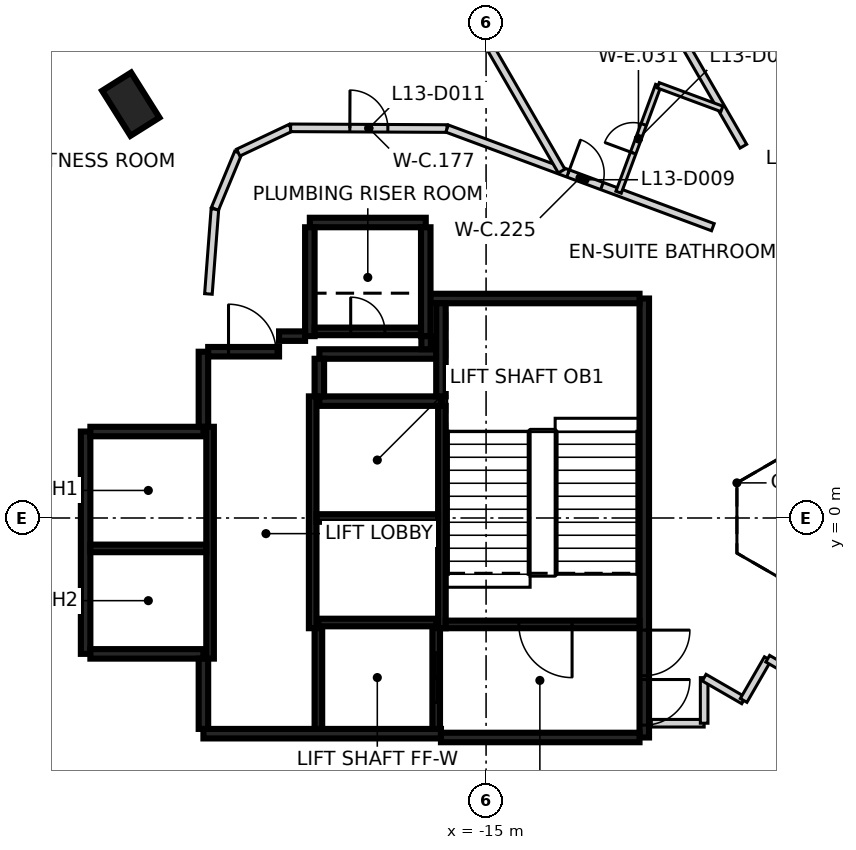
"""IFC4 building model, lengths in metres.
Left out: names, types, materials, properties, quantities, classifications, styles, units other than length and angle.
Written with IfcOpenShell. Run it as: python <this file> out.ifc"""

import sys

from ifc_helpers import new_model, si_unit, direction, frame, frame_2d, origin, origin_2d, place, context, subcontext, project, spatial, rectangle, extrude, element, fill, save


model = new_model("IFC4")
c1 = context("Model", 3, precision=1e-05, world=origin(), true_north=direction((0.0, 1.0)))
c2 = subcontext(c1, "Body", "Model", "MODEL_VIEW")
j1 = project(units=[si_unit("LENGTHUNIT", "METRE"), si_unit("PLANEANGLEUNIT", "RADIAN")], contexts=[c1])
p1 = place(None, origin())
s1 = spatial("IfcSite", under=j1, at=p1, CompositionType="ELEMENT")
p2 = place(p1, origin())
s2 = spatial("IfcBuilding", under=s1, at=p2, CompositionType="ELEMENT")
p3 = place(p2, frame((0.0, 0.0, 60.2)))
s3 = spatial("IfcBuildingStorey", under=s2, at=p3, CompositionType="ELEMENT", Elevation=60.2)
p4 = place(p3, frame((-24.349, 10.888, -0.475), z_axis=(0.0, 0.0, 1.0), x_axis=(-0.532388815436, 0.84649994046, 0.0)))
e1 = element("IfcColumn", 1, at=p4, inside=s3, PredefinedType="COLUMN", context=c2, shape_type="SweptSolid", body=[
    extrude(rectangle(XDim=1.4, YDim=0.9, at=origin_2d()), origin(), (0.0, 0.0, 1.0), 3.6),
])
p5 = place(p3, frame((-10.837, 5.775, 0.0), z_axis=(0.0, 0.0, 1.0), x_axis=(0.0, -1.0, 0.0)))
e2 = element("IfcWall", 2, at=p5, inside=s3, PredefinedType="SHEAR", context=c2, shape_type="SweptSolid", body=[
    extrude(rectangle(XDim=11.55, YDim=0.25, at=frame_2d((5.775, 0.0))), origin(), (0.0, 0.0, 1.0), 3.125),
])
p6 = place(p5, frame((10.025, 0.0, 0.0)))
e3 = element("IfcOpeningElement", 3, at=p6, cuts=e2, PredefinedType="OPENING", context=c2, shape_type="SweptSolid", body=[
    extrude(rectangle(XDim=1.2, YDim=2.1, at=frame_2d((0.6, 1.05))), frame((0.0, 0.135, 0.0), z_axis=(0.0, -1.0, 0.0), x_axis=(1.0, 0.0, 0.0)), (0.0, 0.0, 1.0), 0.27),
])
p7 = place(p5, frame((8.725, 0.0, 0.0)))
e4 = element("IfcOpeningElement", 4, at=p7, cuts=e2, PredefinedType="OPENING", context=c2, shape_type="SweptSolid", body=[
    extrude(rectangle(XDim=1.2, YDim=2.1, at=frame_2d((0.6, 1.05))), frame((0.0, 0.135, 0.0), z_axis=(0.0, -1.0, 0.0), x_axis=(1.0, 0.0, 0.0)), (0.0, 0.0, 1.0), 0.27),
])
p8 = place(p3, frame((-16.187, -5.675, 0.0), z_axis=(0.0, 0.0, 1.0), x_axis=(-1.0, 0.0, 0.0)))
e5 = element("IfcWall", 5, at=p8, inside=s3, PredefinedType="SHEAR", context=c2, shape_type="SweptSolid", body=[
    extrude(rectangle(XDim=6.25, YDim=0.25, at=frame_2d((3.125, 0.0))), origin(), (0.0, 0.0, 1.0), 3.125),
])
p9 = place(p3, frame((-25.537, -3.575, 0.0), z_axis=(0.0, 0.0, 1.0), x_axis=(0.0, 1.0, 0.0)))
e6 = element("IfcWall", 6, at=p9, inside=s3, PredefinedType="SHEAR", context=c2, shape_type="SweptSolid", body=[
    extrude(rectangle(XDim=5.85, YDim=0.25, at=frame_2d((2.925, 0.0))), origin(), (0.0, 0.0, 1.0), 3.125),
])
p10 = place(p3, frame((-10.963, -5.775, 0.0), z_axis=(0.0, 0.0, 1.0), x_axis=(-1.0, 0.0, 0.0)))
e7 = element("IfcWall", 7, at=p10, inside=s3, PredefinedType="SHEAR", context=c2, shape_type="SweptSolid", body=[
    extrude(rectangle(XDim=5.225, YDim=0.25, at=frame_2d((2.612, 0.0))), origin(), (0.0, 0.0, 1.0), 3.125),
])
p11 = place(p3, frame((-16.472, 5.775, 0.0), z_axis=(0.0, 0.0, 1.0), x_axis=(1.0, 0.0, 0.0)))
e8 = element("IfcWall", 8, at=p11, inside=s3, PredefinedType="SHEAR", context=c2, shape_type="SweptSolid", body=[
    extrude(rectangle(XDim=5.51, YDim=0.25, at=frame_2d((2.755, 0.0))), origin(), (0.0, 0.0, 1.0), 3.125),
])
p12 = place(p3, frame((-19.387, 3.075, 0.0), z_axis=(0.0, 0.0, 1.0), x_axis=(1.0, 0.0, 0.0)))
e9 = element("IfcWall", 9, at=p12, inside=s3, PredefinedType="SHEAR", context=c2, shape_type="SweptSolid", body=[
    extrude(rectangle(XDim=3.2, YDim=0.25, at=frame_2d((1.6, 0.0))), origin(), (0.0, 0.0, 1.0), 3.125),
])
for number, where, z_axis, x_axis in (
    (10, (-22.437, -3.575, 0.0), (0.0, 0.0, 1.0), (-1.0, 0.0, 0.0)),
    (11, (-25.412, 2.275, 0.0), (0.0, 0.0, 1.0), (1.0, 0.0, 0.0)),
):
    element("IfcWall", number, at=place(p3, frame(where, z_axis=z_axis, x_axis=x_axis)), inside=s3, PredefinedType="SHEAR", context=c2, shape_type="SweptSolid", body=[
        extrude(rectangle(XDim=2.975, YDim=0.25, at=frame_2d((1.487, 0.0))), origin(), (0.0, 0.0, 1.0), 3.125),
    ])
p13 = place(p3, frame((-19.637, 7.775, 0.0), z_axis=(0.0, 0.0, 1.0), x_axis=(1.0, 0.0, 0.0)))
e12 = element("IfcWall", 12, at=p13, inside=s3, PredefinedType="SHEAR", context=c2, shape_type="SweptSolid", body=[
    extrude(rectangle(XDim=3.05, YDim=0.25, at=frame_2d((1.525, 0.0))), origin(), (0.0, 0.0, 1.0), 3.125),
])
for number, where, z_axis, x_axis in (
    (13, (-16.587, 7.65, 0.0), (0.0, 0.0, 1.0), (0.0, -1.0, 0.0)),
    (14, (-19.637, 4.785, 0.0), (0.0, 0.0, 1.0), (0.0, 1.0, 0.0)),
):
    element("IfcWall", number, at=place(p3, frame(where, z_axis=z_axis, x_axis=x_axis)), inside=s3, PredefinedType="SHEAR", context=c2, shape_type="SweptSolid", body=[
        extrude(rectangle(XDim=2.865, YDim=0.25, at=frame_2d((1.432, 0.0))), origin(), (0.0, 0.0, 1.0), 3.125),
    ])
p14 = place(p3, frame((-16.302, 4.315, 0.0), z_axis=(0.0, 0.0, 1.0), x_axis=(-1.0, 0.0, 0.0)))
e15 = element("IfcWall", 15, at=p14, inside=s3, PredefinedType="SHEAR", context=c2, shape_type="SweptSolid", body=[
    extrude(rectangle(XDim=3.085, YDim=0.25, at=frame_2d((1.542, 0.0))), origin(), (0.0, 0.0, 1.0), 3.125),
])
p15 = place(p3, frame((-16.187, 3.2, 0.0), z_axis=(0.0, 0.0, 1.0), x_axis=(0.0, 1.0, 0.0)))
e16 = element("IfcWall", 16, at=p15, inside=s3, PredefinedType="SHEAR", context=c2, shape_type="SweptSolid", body=[
    extrude(rectangle(XDim=2.449, YDim=0.25, at=frame_2d((1.225, 0.0))), origin(), (0.0, 0.0, 1.0), 3.125),
])
p16 = place(p3, frame((-22.437, 2.4, 0.0), z_axis=(0.0, 0.0, 1.0), x_axis=(0.0, 1.0, 0.0)))
e17 = element("IfcWall", 17, at=p16, inside=s3, PredefinedType="SHEAR", context=c2, shape_type="SweptSolid", body=[
    extrude(rectangle(XDim=1.975, YDim=0.25, at=frame_2d((0.987, 0.0))), origin(), (0.0, 0.0, 1.0), 3.125),
])
p17 = place(p3, frame((-22.437, -5.55, 0.0), z_axis=(0.0, 0.0, 1.0), x_axis=(0.0, 1.0, 0.0)))
e18 = element("IfcWall", 18, at=p17, inside=s3, PredefinedType="SHEAR", context=c2, shape_type="SweptSolid", body=[
    extrude(rectangle(XDim=1.849, YDim=0.25, at=frame_2d((0.925, 0.0))), origin(), (0.0, 0.0, 1.0), 3.125),
])
p18 = place(p3, frame((-22.312, 4.375, 0.0), z_axis=(0.0, 0.0, 1.0), x_axis=(1.0, 0.0, 0.0)))
e19 = element("IfcWall", 19, at=p18, inside=s3, PredefinedType="SHEAR", context=c2, shape_type="SweptSolid", body=[
    extrude(rectangle(XDim=1.865, YDim=0.25, at=frame_2d((0.932, 0.0))), origin(), (0.0, 0.0, 1.0), 3.125),
])
p19 = place(p18, frame((0.535, 0.0, 0.0)))
e20 = element("IfcOpeningElement", 20, at=p19, cuts=e19, PredefinedType="OPENING", context=c2, shape_type="SweptSolid", body=[
    extrude(rectangle(XDim=1.25, YDim=2.1, at=frame_2d((0.625, 1.05))), frame((0.0, 0.135, 0.0), z_axis=(0.0, -1.0, 0.0), x_axis=(1.0, 0.0, 0.0)), (0.0, 0.0, 1.0), 0.27),
])
p20 = place(p3, frame((-19.387, 4.19, 0.0), z_axis=(0.0, 0.0, 1.0), x_axis=(0.0, -1.0, 0.0)))
e21 = element("IfcWall", 21, at=p20, inside=s3, PredefinedType="SHEAR", context=c2, shape_type="SweptSolid", body=[
    extrude(rectangle(XDim=0.989, YDim=0.25, at=frame_2d((0.495, 0.0))), origin(), (0.0, 0.0, 1.0), 3.125),
])
p21 = place(p3, frame((-20.447, 4.785, 0.0), z_axis=(0.0, 0.0, 1.0), x_axis=(1.0, 0.0, 0.0)))
e22 = element("IfcWall", 22, at=p21, inside=s3, PredefinedType="SHEAR", context=c2, shape_type="SweptSolid", body=[
    extrude(rectangle(XDim=0.685, YDim=0.25, at=frame_2d((0.342, 0.0))), origin(), (0.0, 0.0, 1.0), 3.125),
])
p22 = place(p3, frame((-16.577, 4.785, 0.0), z_axis=(0.0, 0.0, 1.0), x_axis=(0.0, -1.0, 0.0)))
e23 = element("IfcWall", 23, at=p22, inside=s3, PredefinedType="SHEAR", context=c2, shape_type="SweptSolid", body=[
    extrude(rectangle(XDim=0.344, YDim=0.25, at=frame_2d((0.172, 0.0))), origin(), (0.0, 0.0, 1.0), 3.125),
])
p23 = place(p3, frame((-16.162, 2.951, 0.0), z_axis=(0.0, 0.0, 1.0), x_axis=(0.0, -1.0, 0.0)))
e24 = element("IfcWall", 24, at=p23, inside=s3, PredefinedType="SHEAR", context=c2, shape_type="SweptSolid", body=[
    extrude(rectangle(XDim=5.851, YDim=0.2, at=frame_2d((2.925, 0.0))), origin(), (0.0, 0.0, 1.0), 3.125),
])
for number, where, z_axis, x_axis in (
    (25, (-19.562, -2.9, 0.0), (0.0, 0.0, 1.0), (0.0, 1.0, 0.0)),
    (26, (-22.262, 2.4, 0.0), (0.0, 0.0, 1.0), (0.0, -1.0, 0.0)),
):
    element("IfcWall", number, at=place(p3, frame(where, z_axis=z_axis, x_axis=x_axis)), inside=s3, PredefinedType="SHEAR", context=c2, shape_type="SweptSolid", body=[
        extrude(rectangle(XDim=6.1, YDim=0.2, at=frame_2d((3.05, 0.0))), origin(), (0.0, 0.0, 1.0), 3.125),
    ])
p24 = place(p3, frame((-10.963, -2.8, 0.0), z_axis=(0.0, 0.0, 1.0), x_axis=(-1.0, 0.0, 0.0)))
e27 = element("IfcWall", 27, at=p24, inside=s3, PredefinedType="SHEAR", context=c2, shape_type="SweptSolid", body=[
    extrude(rectangle(XDim=5.098, YDim=0.2, at=frame_2d((2.549, 0.0))), origin(), (0.0, 0.0, 1.0), 3.125),
])
p25 = place(p24, frame((1.774, 0.0, 0.0)))
e28 = element("IfcOpeningElement", 28, at=p25, cuts=e27, PredefinedType="OPENING", context=c2, shape_type="SweptSolid", body=[
    extrude(rectangle(XDim=1.4, YDim=2.1, at=frame_2d((0.7, 1.05))), frame((0.0, 0.11, 0.0), z_axis=(0.0, -1.0, 0.0), x_axis=(1.0, 0.0, 0.0)), (0.0, 0.0, 1.0), 0.22),
])
p26 = place(p3, frame((-16.263, 0.0, 0.0), z_axis=(0.0, 0.0, 1.0), x_axis=(-1.0, 0.0, 0.0)))
e29 = element("IfcWall", 29, at=p26, inside=s3, PredefinedType="SHEAR", context=c2, shape_type="SweptSolid", body=[
    extrude(rectangle(XDim=3.198, YDim=0.2, at=frame_2d((1.599, 0.0))), origin(), (0.0, 0.0, 1.0), 3.125),
])
p27 = place(p3, frame((-22.363, -0.8, 0.0), z_axis=(0.0, 0.0, 1.0), x_axis=(-1.0, 0.0, 0.0)))
e30 = element("IfcWall", 30, at=p27, inside=s3, PredefinedType="SHEAR", context=c2, shape_type="SweptSolid", body=[
    extrude(rectangle(XDim=3.048, YDim=0.2, at=frame_2d((1.524, 0.0))), origin(), (0.0, 0.0, 1.0), 3.125),
])
p28 = place(p3, frame((-19.511, 4.91, 0.0), z_axis=(0.0, 0.0, 1.0), x_axis=(1.0, 0.0, 0.0)))
e31 = element("IfcWall", 31, at=p28, inside=s3, PredefinedType="SHEAR", context=c2, shape_type="SweptSolid", body=[
    extrude(rectangle(XDim=2.798, YDim=0.2, at=frame_2d((1.399, 0.0))), origin(), (0.0, 0.0, 1.0), 3.125),
])
p29 = place(p28, frame((0.949, 0.0, 0.0)))
e32 = element("IfcOpeningElement", 32, at=p29, cuts=e31, PredefinedType="OPENING", context=c2, shape_type="SweptSolid", body=[
    extrude(rectangle(XDim=0.9, YDim=2.1, at=frame_2d((0.45, 1.05))), frame((0.0, 0.11, 0.0), z_axis=(0.0, -1.0, 0.0), x_axis=(1.0, 0.0, 0.0)), (0.0, 0.0, 1.0), 0.22),
])
p30 = place(p3, frame((-19.412, -2.75, 0.0), z_axis=(0.0, 0.0, 1.0), x_axis=(1.0, 0.0, 0.0)))
e33 = element("IfcWall", 33, at=p30, inside=s3, PredefinedType="SHEAR", context=c2, shape_type="SweptSolid", body=[
    extrude(rectangle(XDim=3.1, YDim=0.2, at=frame_2d((1.55, 0.0))), origin(), (0.0, 0.0, 1.0), 3.125),
])
p31 = place(p3, frame((-16.312, -2.898, 0.0), z_axis=(0.0, 0.0, 1.0), x_axis=(0.0, -1.0, 0.0)))
e34 = element("IfcWall", 34, at=p31, inside=s3, PredefinedType="SHEAR", context=c2, shape_type="SweptSolid", body=[
    extrude(rectangle(XDim=2.651, YDim=0.2, at=frame_2d((1.325, 0.0))), origin(), (0.0, 0.0, 1.0), 3.125),
])
p32 = place(p31, frame((0.652, 0.0, 0.0)))
e35 = element("IfcOpeningElement", 35, at=p32, cuts=e34, PredefinedType="OPENING", context=c2, shape_type="SweptSolid", body=[
    extrude(rectangle(XDim=1.3, YDim=2.1, at=frame_2d((0.65, 1.05))), frame((0.0, 0.11, 0.0), z_axis=(0.0, -1.0, 0.0), x_axis=(1.0, 0.0, 0.0)), (0.0, 0.0, 1.0), 0.22),
])
p33 = place(p3, frame((-19.412, -5.549, 0.0), z_axis=(0.0, 0.0, 1.0), x_axis=(0.0, 1.0, 0.0)))
e36 = element("IfcWall", 36, at=p33, inside=s3, PredefinedType="SHEAR", context=c2, shape_type="SweptSolid", body=[
    extrude(rectangle(XDim=2.651, YDim=0.2, at=frame_2d((1.325, 0.0))), origin(), (0.0, 0.0, 1.0), 3.125),
])
p34 = place(p3, frame((-22.306, 5.895, 0.0), z_axis=(0.0, 0.0, 1.0), x_axis=(0.076246699626, 0.997088983389, 0.0)))
e37 = element("IfcWall", 37, at=p34, inside=s3, PredefinedType="PARTITIONING", context=c2, shape_type="SweptSolid", body=[
    extrude(rectangle(XDim=2.241, YDim=0.2, at=frame_2d((1.121, 0.0))), origin(), (0.0, 0.0, 1.0), 3.125),
])
p35 = place(p3, frame((-22.135, 8.134, 0.0), z_axis=(0.0, 0.0, 1.0), x_axis=(0.383208453534, 0.923661886807, 0.0)))
e38 = element("IfcWall", 38, at=p35, inside=s3, PredefinedType="PARTITIONING", context=c2, shape_type="SweptSolid", body=[
    extrude(rectangle(XDim=1.602, YDim=0.2, at=frame_2d((0.801, 0.0))), origin(), (0.0, 0.0, 1.0), 3.125),
])
p36 = place(p3, frame((-21.521, 9.614, 0.0), z_axis=(0.0, 0.0, 1.0), x_axis=(0.904083527367, 0.427355795028, 0.0)))
e39 = element("IfcWall", 39, at=p36, inside=s3, PredefinedType="PARTITIONING", context=c2, shape_type="SweptSolid", body=[
    extrude(rectangle(XDim=1.523, YDim=0.2, at=frame_2d((0.761, 0.0))), origin(), (0.0, 0.0, 1.0), 3.125),
])
p37 = place(p3, frame((-20.143, 10.266, 0.0), z_axis=(0.0, 0.0, 1.0), x_axis=(0.999989297417, -0.004626559416, 0.0)))
e40 = element("IfcWall", 40, at=p37, inside=s3, PredefinedType="PARTITIONING", context=c2, shape_type="SweptSolid", body=[
    extrude(rectangle(XDim=4.116, YDim=0.2, at=frame_2d((2.058, 0.0))), origin(), (0.0, 0.0, 1.0), 3.125),
])
p38 = place(p37, frame((1.558, 0.0, 0.0)))
e41 = element("IfcOpeningElement", 41, at=p38, cuts=e40, PredefinedType="OPENING", context=c2, shape_type="SweptSolid", body=[
    extrude(rectangle(XDim=1.0, YDim=2.1, at=frame_2d((0.5, 1.05))), frame((0.0, 0.11, 0.0), z_axis=(0.0, -1.0, 0.0), x_axis=(1.0, 0.0, 0.0)), (0.0, 0.0, 1.0), 0.22),
])
p39 = place(p3, frame((-16.026, 10.247, 0.0), z_axis=(0.0, 0.0, 1.0), x_axis=(0.937540909117, -0.347875040397, 0.0)))
e42 = element("IfcWall", 42, at=p39, inside=s3, PredefinedType="PARTITIONING", context=c2, shape_type="SweptSolid", body=[
    extrude(rectangle(XDim=7.459, YDim=0.2, at=frame_2d((3.729, 0.0))), origin(), (0.0, 0.0, 1.0), 3.125),
])
p40 = place(p39, frame((3.396, 0.0, 0.0)))
e43 = element("IfcOpeningElement", 43, at=p40, cuts=e42, PredefinedType="OPENING", context=c2, shape_type="SweptSolid", body=[
    extrude(rectangle(XDim=0.95, YDim=2.1, at=frame_2d((0.475, 1.05))), frame((0.0, 0.11, 0.0), z_axis=(0.0, -1.0, 0.0), x_axis=(1.0, 0.0, 0.0)), (0.0, 0.0, 1.0), 0.22),
])
p41 = place(p3, frame((-10.652, -5.4, 0.0), z_axis=(0.0, 0.0, 1.0), x_axis=(1.0, 0.0, 0.0)))
e44 = element("IfcWall", 44, at=p41, inside=s3, PredefinedType="PARTITIONING", context=c2, shape_type="SweptSolid", body=[
    extrude(rectangle(XDim=1.39, YDim=0.2, at=frame_2d((0.695, 0.0))), origin(), (0.0, 0.0, 1.0), 3.125),
])
for number, where, z_axis, x_axis in (
    (45, (-9.262, -5.4, 0.0), (0.0, 0.0, 1.0), (0.0, 1.0, 0.0)),
    (46, (-9.262, -4.2, 0.0), (0.0, 0.0, 1.0), (0.866, -0.5, 0.0)),
):
    element("IfcWall", number, at=place(p3, frame(where, z_axis=z_axis, x_axis=x_axis)), inside=s3, PredefinedType="PARTITIONING", context=c2, shape_type="SweptSolid", body=[
        extrude(rectangle(XDim=1.2, YDim=0.2, at=frame_2d((0.6, 0.0))), origin(), (0.0, 0.0, 1.0), 3.125),
    ])
p42 = place(p3, frame((-8.223, -4.8, 0.0), z_axis=(0.0, 0.0, 1.0), x_axis=(0.499866914522, 0.866102227088, 0.0)))
e47 = element("IfcWall", 47, at=p42, inside=s3, PredefinedType="PARTITIONING", context=c2, shape_type="SweptSolid", body=[
    extrude(rectangle(XDim=1.268, YDim=0.2, at=frame_2d((0.634, 0.0))), origin(), (0.0, 0.0, 1.0), 3.125),
])
p43 = place(p3, frame((-7.589, -3.702, 0.0), z_axis=(0.0, 0.0, 1.0), x_axis=(0.865995139556, -0.500052415518, 0.0)))
e48 = element("IfcWall", 48, at=p43, inside=s3, PredefinedType="PARTITIONING", context=c2, shape_type="SweptSolid", body=[
    extrude(rectangle(XDim=8.689, YDim=0.2, at=frame_2d((4.344, 0.0))), origin(), (0.0, 0.0, 1.0), 3.125),
])
p44 = place(p43, frame((0.749, 0.0, 0.0)))
e49 = element("IfcOpeningElement", 49, at=p44, cuts=e48, PredefinedType="OPENING", context=c2, shape_type="SweptSolid", body=[
    extrude(rectangle(XDim=1.0, YDim=2.1, at=frame_2d((0.5, 1.05))), frame((0.0, 0.11, 0.0), z_axis=(0.0, -1.0, 0.0), x_axis=(1.0, 0.0, 0.0)), (0.0, 0.0, 1.0), 0.22),
])
p45 = place(p43, frame((5.819, 0.0, 0.0)))
e50 = element("IfcOpeningElement", 50, at=p45, cuts=e48, PredefinedType="OPENING", context=c2, shape_type="SweptSolid", body=[
    extrude(rectangle(XDim=0.95, YDim=2.1, at=frame_2d((0.475, 1.05))), frame((0.0, 0.11, 0.0), z_axis=(0.0, -1.0, 0.0), x_axis=(1.0, 0.0, 0.0)), (0.0, 0.0, 1.0), 0.22),
])
p46 = place(p3, frame((-17.996, 17.758, 0.0), z_axis=(0.0, 0.0, 1.0), x_axis=(0.500046945013, -0.865998298372, 0.0)))
e51 = element("IfcWall", 51, at=p46, inside=s3, PredefinedType="PARTITIONING", context=c2, shape_type="SweptSolid", body=[
    extrude(rectangle(XDim=9.964, YDim=0.2, at=frame_2d((4.982, 0.0))), origin(), (0.0, 0.0, 1.0), 3.125),
])
p47 = place(p3, frame((-14.149, 20.035, 0.0), z_axis=(0.0, 0.0, 1.0), x_axis=(0.500022967158, -0.866012143284, 0.0)))
e52 = element("IfcWall", 52, at=p47, inside=s3, PredefinedType="PARTITIONING", context=c2, shape_type="SweptSolid", body=[
    extrude(rectangle(XDim=11.838, YDim=0.2, at=frame_2d((5.919, 0.0))), origin(), (0.0, 0.0, 1.0), 3.125),
])
p48 = place(p3, frame((-14.148, -20.035, 0.0), z_axis=(0.0, 0.0, 1.0), x_axis=(0.500005855417, 0.866022023131, 0.0)))
e53 = element("IfcWall", 53, at=p48, inside=s3, PredefinedType="PARTITIONING", context=c2, shape_type="SweptSolid", body=[
    extrude(rectangle(XDim=17.425, YDim=0.2, at=frame_2d((8.712, 0.0))), origin(), (0.0, 0.0, 1.0), 3.125),
])
p49 = place(p3, frame((-10.276, 22.271, 0.0), z_axis=(0.0, 0.0, 1.0), x_axis=(0.499975954304, -0.866039286129, 0.0)))
e54 = element("IfcWall", 54, at=p49, inside=s3, PredefinedType="PARTITIONING", context=c2, shape_type="SweptSolid", body=[
    extrude(rectangle(XDim=17.424, YDim=0.2, at=frame_2d((8.712, 0.0))), origin(), (0.0, 0.0, 1.0), 3.125),
])
p50 = place(p3, frame((-11.513, 8.572, 0.0), z_axis=(0.0, 0.0, 1.0), x_axis=(0.347929104424, 0.937520846859, 0.0)))
e55 = element("IfcWall", 55, at=p50, inside=s3, PredefinedType="PARTITIONING", context=c2, shape_type="SweptSolid", body=[
    extrude(rectangle(XDim=3.0, YDim=0.15, at=frame_2d((1.5, 0.0))), origin(), (0.0, 0.0, 1.0), 3.125),
])
p51 = place(p50, frame((1.1, 0.0, 0.0)))
e56 = element("IfcOpeningElement", 56, at=p51, cuts=e55, PredefinedType="OPENING", context=c2, shape_type="SweptSolid", body=[
    extrude(rectangle(XDim=0.8, YDim=2.1, at=frame_2d((0.4, 1.05))), frame((0.0, 0.085, 0.0), z_axis=(0.0, -1.0, 0.0), x_axis=(1.0, 0.0, 0.0)), (0.0, 0.0, 1.0), 0.17),
])
p52 = place(p3, frame((-10.469, 11.385, 0.0), z_axis=(0.0, 0.0, 1.0), x_axis=(0.937487768635, -0.348018223173, 0.0)))
e57 = element("IfcWall", 57, at=p52, inside=s3, PredefinedType="PARTITIONING", context=c2, shape_type="SweptSolid", body=[
    extrude(rectangle(XDim=1.785, YDim=0.15, at=frame_2d((0.892, 0.0))), origin(), (0.0, 0.0, 1.0), 3.125),
])
p53 = place(p32, origin())
e58 = element("IfcDoor", 58, at=p53, inside=s3, OperationType="SLIDING_TO_LEFT", PredefinedType="DOOR", context=c2, shape_type="SweptSolid", body=[
    extrude(rectangle(XDim=1.3, YDim=2.1, at=frame_2d((0.65, 1.05))), frame((0.0, 0.025, 0.0), z_axis=(0.0, -1.0, 0.0), x_axis=(1.0, 0.0, 0.0)), (0.0, 0.0, 1.0), 0.05),
])
fill(e35, e58)
p54 = place(p19, origin())
e59 = element("IfcDoor", 59, at=p54, inside=s3, OperationType="SINGLE_SWING_LEFT", PredefinedType="DOOR", context=c2, shape_type="SweptSolid", body=[
    extrude(rectangle(XDim=1.25, YDim=2.1, at=frame_2d((0.625, 1.05))), frame((0.0, 0.025, 0.0), z_axis=(0.0, -1.0, 0.0), x_axis=(1.0, 0.0, 0.0)), (0.0, 0.0, 1.0), 0.05),
])
fill(e20, e59)
p55 = place(p6, origin())
e60 = element("IfcDoor", 60, at=p55, inside=s3, OperationType="SINGLE_SWING_LEFT", PredefinedType="DOOR", context=c2, shape_type="SweptSolid", body=[
    extrude(rectangle(XDim=1.2, YDim=2.1, at=frame_2d((0.6, 1.05))), frame((0.0, 0.025, 0.0), z_axis=(0.0, -1.0, 0.0), x_axis=(1.0, 0.0, 0.0)), (0.0, 0.0, 1.0), 0.05),
])
fill(e3, e60)
p56 = place(p7, origin())
e61 = element("IfcDoor", 61, at=p56, inside=s3, OperationType="SINGLE_SWING_RIGHT", PredefinedType="DOOR", context=c2, shape_type="SweptSolid", body=[
    extrude(rectangle(XDim=1.2, YDim=2.1, at=frame_2d((0.6, 1.05))), frame((0.0, 0.025, 0.0), z_axis=(0.0, -1.0, 0.0), x_axis=(1.0, 0.0, 0.0)), (0.0, 0.0, 1.0), 0.05),
])
fill(e4, e61)
p57 = place(p25, origin())
e62 = element("IfcDoor", 62, at=p57, inside=s3, OperationType="SINGLE_SWING_LEFT", PredefinedType="DOOR", context=c2, shape_type="SweptSolid", body=[
    extrude(rectangle(XDim=1.4, YDim=2.1, at=frame_2d((0.7, 1.05))), frame((0.0, 0.025, 0.0), z_axis=(0.0, -1.0, 0.0), x_axis=(1.0, 0.0, 0.0)), (0.0, 0.0, 1.0), 0.05),
])
fill(e28, e62)
p58 = place(p29, origin())
e63 = element("IfcDoor", 63, at=p58, inside=s3, OperationType="SINGLE_SWING_RIGHT", PredefinedType="DOOR", context=c2, shape_type="SweptSolid", body=[
    extrude(rectangle(XDim=0.9, YDim=2.1, at=frame_2d((0.45, 1.05))), frame((0.0, 0.025, 0.0), z_axis=(0.0, -1.0, 0.0), x_axis=(1.0, 0.0, 0.0)), (0.0, 0.0, 1.0), 0.05),
])
fill(e32, e63)
p59 = place(p40, origin())
e64 = element("IfcDoor", 64, at=p59, inside=s3, OperationType="SINGLE_SWING_LEFT", PredefinedType="DOOR", context=c2, shape_type="SweptSolid", body=[
    extrude(rectangle(XDim=0.95, YDim=2.1, at=frame_2d((0.475, 1.05))), frame((0.0, 0.025, 0.0), z_axis=(0.0, -1.0, 0.0), x_axis=(1.0, 0.0, 0.0)), (0.0, 0.0, 1.0), 0.05),
])
fill(e43, e64)
p60 = place(p51, origin())
e65 = element("IfcDoor", 65, at=p60, inside=s3, OperationType="SINGLE_SWING_LEFT", PredefinedType="DOOR", context=c2, shape_type="SweptSolid", body=[
    extrude(rectangle(XDim=0.8, YDim=2.1, at=frame_2d((0.4, 1.05))), frame((0.0, 0.025, 0.0), z_axis=(0.0, -1.0, 0.0), x_axis=(1.0, 0.0, 0.0)), (0.0, 0.0, 1.0), 0.05),
])
fill(e56, e65)
p61 = place(p38, origin())
e66 = element("IfcDoor", 66, at=p61, inside=s3, OperationType="SINGLE_SWING_LEFT", PredefinedType="DOOR", context=c2, shape_type="SweptSolid", body=[
    extrude(rectangle(XDim=1.0, YDim=2.1, at=frame_2d((0.5, 1.05))), frame((0.0, 0.025, 0.0), z_axis=(0.0, -1.0, 0.0), x_axis=(1.0, 0.0, 0.0)), (0.0, 0.0, 1.0), 0.05),
])
fill(e41, e66)
save(model, sys.argv[1])
